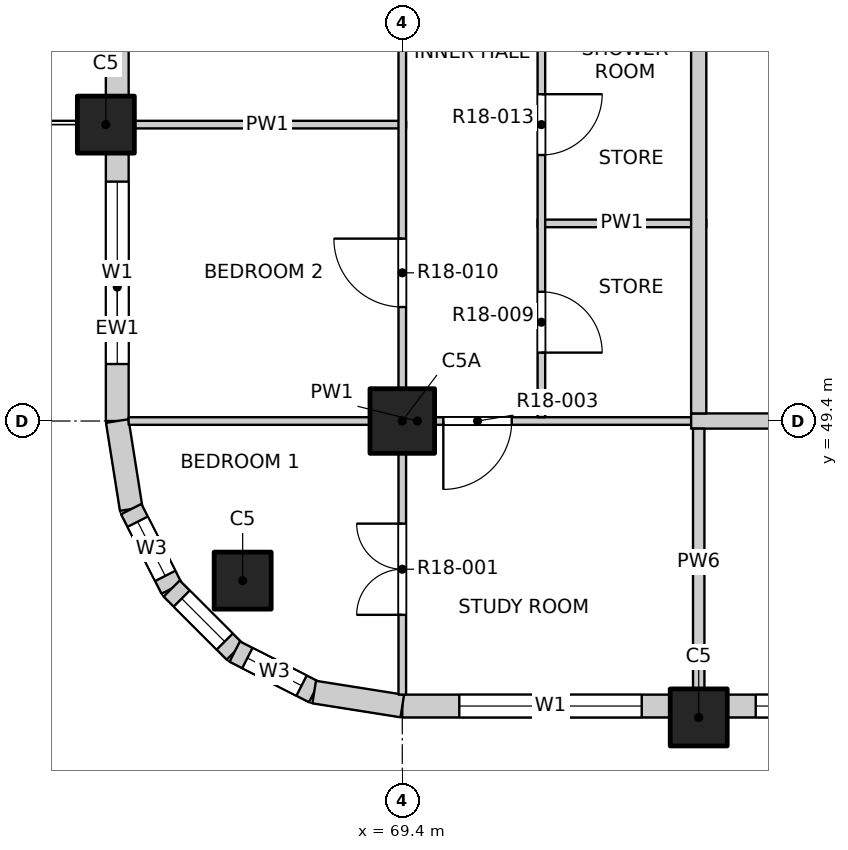
"""IFC4 building model, lengths in metres.
Left out: names, types, materials, properties, quantities, classifications, styles, units other than length and angle.
Written with IfcOpenShell. Run it as: python <this file> out.ifc"""

import sys

from ifc_helpers import new_model, si_unit, direction, frame, frame_2d, origin, origin_2d, place, context, subcontext, project, spatial, rectangle, extrude, element, fill, save


model = new_model("IFC4")
c1 = context("Model", 3, precision=1e-05, world=origin(), true_north=direction((0.0, 1.0)))
c2 = subcontext(c1, "Body", "Model", "MODEL_VIEW")
j1 = project(units=[si_unit("LENGTHUNIT", "METRE"), si_unit("PLANEANGLEUNIT", "RADIAN")], contexts=[c1])
p1 = place(None, origin())
s1 = spatial("IfcSite", under=j1, at=p1, CompositionType="ELEMENT")
p2 = place(p1, origin())
s2 = spatial("IfcBuilding", under=s1, at=p2, CompositionType="ELEMENT")
p3 = place(p2, frame((0.0, 0.0, 186.0)))
s3 = spatial("IfcBuildingStorey", under=s2, at=p3, CompositionType="ELEMENT", Elevation=186.0)
for number, where, z_axis, x_axis in (
    (1, (67.3, 47.3, -0.25), (0.0, 0.0, 1.0), (1.0, 0.0, 0.0)),
    (2, (65.5, 53.3, -0.25), (0.0, 0.0, 1.0), (1.0, 0.0, 0.0)),
    (3, (73.3, 45.5, -0.25), (0.0, 0.0, 1.0), (1.0, 0.0, 0.0)),
):
    element("IfcColumn", number, at=place(p3, frame(where, z_axis=z_axis, x_axis=x_axis)), inside=s3, PredefinedType="COLUMN", context=c2, shape_type="SweptSolid", body=[
        extrude(rectangle(XDim=0.75, YDim=0.75, at=origin_2d()), origin(), (0.0, 0.0, 1.0), 3.4),
    ])
p4 = place(p3, frame((69.4, 49.4, -0.25), z_axis=(0.0, 0.0, 1.0), x_axis=(1.0, 0.0, 0.0)))
e4 = element("IfcColumn", 4, at=p4, inside=s3, PredefinedType="COLUMN", context=c2, shape_type="SweptSolid", body=[
    extrude(rectangle(XDim=0.85, YDim=0.85, at=origin_2d()), origin(), (0.0, 0.0, 1.0), 3.4),
])
p5 = place(p3, frame((69.4, 45.65, 0.0), z_axis=(0.0, 0.0, 1.0), x_axis=(1.0, 0.0, 0.0)))
e5 = element("IfcWall", 5, at=p5, inside=s3, PredefinedType="SOLIDWALL", context=c2, shape_type="SweptSolid", body=[
    extrude(rectangle(XDim=3.525, YDim=0.3, at=frame_2d((1.763, 0.0))), origin(), (0.0, 0.0, 1.0), 2.7),
])
p6 = place(p5, frame((0.75, 0.0, 0.9)))
e6 = element("IfcOpeningElement", 6, at=p6, cuts=e5, PredefinedType="OPENING", context=c2, shape_type="SweptSolid", body=[
    extrude(rectangle(XDim=2.4, YDim=1.8, at=frame_2d((1.2, 0.9))), frame((0.0, 0.16, 0.0), z_axis=(0.0, -1.0, 0.0), x_axis=(1.0, 0.0, 0.0)), (0.0, 0.0, 1.0), 0.32),
])
p7 = place(p3, frame((73.675, 45.65, 0.0), z_axis=(0.0, 0.0, 1.0), x_axis=(1.0, 0.0, 0.0)))
e7 = element("IfcWall", 7, at=p7, inside=s3, PredefinedType="SOLIDWALL", context=c2, shape_type="SweptSolid", body=[
    extrude(rectangle(XDim=7.05, YDim=0.3, at=frame_2d((3.525, 0.0))), origin(), (0.0, 0.0, 1.0), 2.7),
])
p8 = place(p7, frame((0.375, 0.0, 0.9)))
e8 = element("IfcOpeningElement", 8, at=p8, cuts=e7, PredefinedType="OPENING", context=c2, shape_type="SweptSolid", body=[
    extrude(rectangle(XDim=2.4, YDim=1.8, at=frame_2d((1.2, 0.9))), frame((0.0, 0.16, 0.0), z_axis=(0.0, -1.0, 0.0), x_axis=(1.0, 0.0, 0.0)), (0.0, 0.0, 1.0), 0.32),
])
p9 = place(p7, frame((4.275, 0.0, 0.9)))
e9 = element("IfcOpeningElement", 9, at=p9, cuts=e7, PredefinedType="OPENING", context=c2, shape_type="SweptSolid", body=[
    extrude(rectangle(XDim=2.4, YDim=1.8, at=frame_2d((1.2, 0.9))), frame((0.0, 0.16, 0.0), z_axis=(0.0, -1.0, 0.0), x_axis=(1.0, 0.0, 0.0)), (0.0, 0.0, 1.0), 0.32),
])
p10 = place(p3, frame((65.65, 49.4, 0.0), z_axis=(0.0, 0.0, 1.0), x_axis=(0.0, 1.0, 0.0)))
e10 = element("IfcWall", 10, at=p10, inside=s3, PredefinedType="SOLIDWALL", context=c2, shape_type="SweptSolid", body=[
    extrude(rectangle(XDim=3.525, YDim=0.3, at=frame_2d((1.763, 0.0))), origin(), (0.0, 0.0, 1.0), 2.7),
])
p11 = place(p10, frame((0.75, 0.0, 0.9)))
e11 = element("IfcOpeningElement", 11, at=p11, cuts=e10, PredefinedType="OPENING", context=c2, shape_type="SweptSolid", body=[
    extrude(rectangle(XDim=2.4, YDim=1.8, at=frame_2d((1.2, 0.9))), frame((0.0, 0.16, 0.0), z_axis=(0.0, -1.0, 0.0), x_axis=(1.0, 0.0, 0.0)), (0.0, 0.0, 1.0), 0.32),
])
p12 = place(p3, frame((65.65, 53.675, 0.0), z_axis=(0.0, 0.0, 1.0), x_axis=(0.0, 1.0, 0.0)))
e12 = element("IfcWall", 12, at=p12, inside=s3, PredefinedType="SOLIDWALL", context=c2, shape_type="SweptSolid", body=[
    extrude(rectangle(XDim=7.05, YDim=0.3, at=frame_2d((3.525, 0.0))), origin(), (0.0, 0.0, 1.0), 2.7),
])
p13 = place(p12, frame((0.675, 0.0, 0.0)))
e13 = element("IfcOpeningElement", 13, at=p13, cuts=e12, PredefinedType="OPENING", context=c2, shape_type="SweptSolid", body=[
    extrude(rectangle(XDim=1.8, YDim=2.4, at=frame_2d((0.9, 1.2))), frame((0.0, 0.16, 0.0), z_axis=(0.0, -1.0, 0.0), x_axis=(1.0, 0.0, 0.0)), (0.0, 0.0, 1.0), 0.32),
])
p14 = place(p12, frame((4.275, 0.0, 0.9)))
e14 = element("IfcOpeningElement", 14, at=p14, cuts=e12, PredefinedType="OPENING", context=c2, shape_type="SweptSolid", body=[
    extrude(rectangle(XDim=2.4, YDim=1.8, at=frame_2d((1.2, 0.9))), frame((0.0, 0.16, 0.0), z_axis=(0.0, -1.0, 0.0), x_axis=(1.0, 0.0, 0.0)), (0.0, 0.0, 1.0), 0.32),
])
p15 = place(p3, frame((65.65, 49.4, 0.0), z_axis=(0.0, 0.0, 1.0), x_axis=(0.156496880861, -0.987678452879, 0.0)))
e15 = element("IfcWall", 15, at=p15, inside=s3, PredefinedType="SOLIDWALL", context=c2, shape_type="SweptSolid", body=[
    extrude(rectangle(XDim=1.173, YDim=0.3, at=frame_2d((0.586, 0.0))), origin(), (0.0, 0.0, 1.0), 2.7),
])
p16 = place(p3, frame((65.833, 48.241, 0.0), z_axis=(0.0, 0.0, 1.0), x_axis=(0.454025524128, -0.890988677504, 0.0)))
e16 = element("IfcWall", 16, at=p16, inside=s3, PredefinedType="SOLIDWALL", context=c2, shape_type="SweptSolid", body=[
    extrude(rectangle(XDim=1.173, YDim=0.3, at=frame_2d((0.587, 0.0))), origin(), (0.0, 0.0, 1.0), 2.7),
])
p17 = place(p16, frame((0.187, 0.0, 0.9)))
e17 = element("IfcOpeningElement", 17, at=p17, cuts=e16, PredefinedType="OPENING", context=c2, shape_type="SweptSolid", body=[
    extrude(rectangle(XDim=0.8, YDim=1.2, at=frame_2d((0.4, 0.6))), frame((0.0, 0.16, 0.0), z_axis=(0.0, -1.0, 0.0), x_axis=(1.0, 0.0, 0.0)), (0.0, 0.0, 1.0), 0.32),
])
p18 = place(p3, frame((66.366, 47.196, 0.0), z_axis=(0.0, 0.0, 1.0), x_axis=(0.707106781187, -0.707106781187, 0.0)))
e18 = element("IfcWall", 18, at=p18, inside=s3, PredefinedType="SOLIDWALL", context=c2, shape_type="SweptSolid", body=[
    extrude(rectangle(XDim=1.173, YDim=0.3, at=frame_2d((0.586, 0.0))), origin(), (0.0, 0.0, 1.0), 2.7),
])
p19 = place(p18, frame((0.187, 0.0, 0.9)))
e19 = element("IfcOpeningElement", 19, at=p19, cuts=e18, PredefinedType="OPENING", context=c2, shape_type="SweptSolid", body=[
    extrude(rectangle(XDim=0.8, YDim=1.2, at=frame_2d((0.4, 0.6))), frame((0.0, 0.16, 0.0), z_axis=(0.0, -1.0, 0.0), x_axis=(1.0, 0.0, 0.0)), (0.0, 0.0, 1.0), 0.32),
])
p20 = place(p3, frame((67.196, 46.366, 0.0), z_axis=(0.0, 0.0, 1.0), x_axis=(0.890988677504, -0.454025524128, 0.0)))
e20 = element("IfcWall", 20, at=p20, inside=s3, PredefinedType="SOLIDWALL", context=c2, shape_type="SweptSolid", body=[
    extrude(rectangle(XDim=1.173, YDim=0.3, at=frame_2d((0.587, 0.0))), origin(), (0.0, 0.0, 1.0), 2.7),
])
p21 = place(p20, frame((0.187, 0.0, 0.9)))
e21 = element("IfcOpeningElement", 21, at=p21, cuts=e20, PredefinedType="OPENING", context=c2, shape_type="SweptSolid", body=[
    extrude(rectangle(XDim=0.8, YDim=1.2, at=frame_2d((0.4, 0.6))), frame((0.0, 0.16, 0.0), z_axis=(0.0, -1.0, 0.0), x_axis=(1.0, 0.0, 0.0)), (0.0, 0.0, 1.0), 0.32),
])
p22 = place(p3, frame((68.241, 45.833, 0.0), z_axis=(0.0, 0.0, 1.0), x_axis=(0.987678452879, -0.156496880861, 0.0)))
e22 = element("IfcWall", 22, at=p22, inside=s3, PredefinedType="SOLIDWALL", context=c2, shape_type="SweptSolid", body=[
    extrude(rectangle(XDim=1.173, YDim=0.3, at=frame_2d((0.586, 0.0))), origin(), (0.0, 0.0, 1.0), 2.7),
])
p23 = place(p3, frame((65.8, 49.4, 0.0), z_axis=(0.0, 0.0, 1.0), x_axis=(1.0, 0.0, 0.0)))
e23 = element("IfcWall", 23, at=p23, inside=s3, PredefinedType="PARTITIONING", context=c2, shape_type="SweptSolid", body=[
    extrude(rectangle(XDim=7.6, YDim=0.1, at=frame_2d((3.8, 0.0))), origin(), (0.0, 0.0, 1.0), 3.15),
])
p24 = place(p23, frame((4.14, 0.0, 0.0)))
e24 = element("IfcOpeningElement", 24, at=p24, cuts=e23, PredefinedType="OPENING", context=c2, shape_type="SweptSolid", body=[
    extrude(rectangle(XDim=0.9, YDim=2.1, at=frame_2d((0.45, 1.05))), frame((0.0, 0.06, 0.0), z_axis=(0.0, -1.0, 0.0), x_axis=(1.0, 0.0, 0.0)), (0.0, 0.0, 1.0), 0.12),
])
p25 = place(p3, frame((73.2, 49.4, 0.0), z_axis=(0.0, 0.0, 1.0), x_axis=(1.0, 0.0, 0.0)))
e25 = element("IfcWall", 25, at=p25, inside=s3, PredefinedType="PARTITIONING", context=c2, shape_type="SweptSolid", body=[
    extrude(rectangle(XDim=23.6, YDim=0.2, at=frame_2d((11.8, 0.0))), origin(), (0.0, 0.0, 1.0), 3.15),
])
p26 = place(p25, frame((4.525, 0.0, 0.0)))
e26 = element("IfcOpeningElement", 26, at=p26, cuts=e25, PredefinedType="OPENING", context=c2, shape_type="SweptSolid", body=[
    extrude(rectangle(XDim=1.2, YDim=2.1, at=frame_2d((0.6, 1.05))), frame((0.0, 0.11, 0.0), z_axis=(0.0, -1.0, 0.0), x_axis=(1.0, 0.0, 0.0)), (0.0, 0.0, 1.0), 0.22),
])
p27 = place(p25, frame((12.325, 0.0, 0.0)))
e27 = element("IfcOpeningElement", 27, at=p27, cuts=e25, PredefinedType="OPENING", context=c2, shape_type="SweptSolid", body=[
    extrude(rectangle(XDim=1.2, YDim=2.1, at=frame_2d((0.6, 1.05))), frame((0.0, 0.11, 0.0), z_axis=(0.0, -1.0, 0.0), x_axis=(1.0, 0.0, 0.0)), (0.0, 0.0, 1.0), 0.22),
])
p28 = place(p25, frame((20.125, 0.0, 0.0)))
e28 = element("IfcOpeningElement", 28, at=p28, cuts=e25, PredefinedType="OPENING", context=c2, shape_type="SweptSolid", body=[
    extrude(rectangle(XDim=1.2, YDim=2.1, at=frame_2d((0.6, 1.05))), frame((0.0, 0.11, 0.0), z_axis=(0.0, -1.0, 0.0), x_axis=(1.0, 0.0, 0.0)), (0.0, 0.0, 1.0), 0.22),
])
p29 = place(p3, frame((71.18, 52.0, 0.0), z_axis=(0.0, 0.0, 1.0), x_axis=(1.0, 0.0, 0.0)))
e29 = element("IfcWall", 29, at=p29, inside=s3, PredefinedType="PARTITIONING", context=c2, shape_type="SweptSolid", body=[
    extrude(rectangle(XDim=2.22, YDim=0.1, at=frame_2d((1.11, 0.0))), origin(), (0.0, 0.0, 1.0), 3.15),
])
p30 = place(p3, frame((65.8, 53.3, 0.0), z_axis=(0.0, 0.0, 1.0), x_axis=(1.0, 0.0, 0.0)))
e30 = element("IfcWall", 30, at=p30, inside=s3, PredefinedType="PARTITIONING", context=c2, shape_type="SweptSolid", body=[
    extrude(rectangle(XDim=3.65, YDim=0.1, at=frame_2d((1.825, 0.0))), origin(), (0.0, 0.0, 1.0), 3.15),
])
p31 = place(p3, frame((69.4, 45.8, 0.0), z_axis=(0.0, 0.0, 1.0), x_axis=(0.0, 1.0, 0.0)))
e31 = element("IfcWall", 31, at=p31, inside=s3, PredefinedType="PARTITIONING", context=c2, shape_type="SweptSolid", body=[
    extrude(rectangle(XDim=38.4, YDim=0.1, at=frame_2d((19.2, 0.0))), origin(), (0.0, 0.0, 1.0), 3.15),
])
p32 = place(p31, frame((1.05, 0.0, 0.0)))
e32 = element("IfcOpeningElement", 32, at=p32, cuts=e31, PredefinedType="OPENING", context=c2, shape_type="SweptSolid", body=[
    extrude(rectangle(XDim=1.2, YDim=2.1, at=frame_2d((0.6, 1.05))), frame((0.0, 0.06, 0.0), z_axis=(0.0, -1.0, 0.0), x_axis=(1.0, 0.0, 0.0)), (0.0, 0.0, 1.0), 0.12),
])
p33 = place(p31, frame((5.1, 0.0, 0.0)))
e33 = element("IfcOpeningElement", 33, at=p33, cuts=e31, PredefinedType="OPENING", context=c2, shape_type="SweptSolid", body=[
    extrude(rectangle(XDim=0.9, YDim=2.1, at=frame_2d((0.45, 1.05))), frame((0.0, 0.06, 0.0), z_axis=(0.0, -1.0, 0.0), x_axis=(1.0, 0.0, 0.0)), (0.0, 0.0, 1.0), 0.12),
])
p34 = place(p31, frame((9.0, 0.0, 0.0)))
e34 = element("IfcOpeningElement", 34, at=p34, cuts=e31, PredefinedType="OPENING", context=c2, shape_type="SweptSolid", body=[
    extrude(rectangle(XDim=0.9, YDim=2.1, at=frame_2d((0.45, 1.05))), frame((0.0, 0.06, 0.0), z_axis=(0.0, -1.0, 0.0), x_axis=(1.0, 0.0, 0.0)), (0.0, 0.0, 1.0), 0.12),
])
p35 = place(p31, frame((12.9, 0.0, 0.0)))
e35 = element("IfcOpeningElement", 35, at=p35, cuts=e31, PredefinedType="OPENING", context=c2, shape_type="SweptSolid", body=[
    extrude(rectangle(XDim=0.9, YDim=2.1, at=frame_2d((0.45, 1.05))), frame((0.0, 0.06, 0.0), z_axis=(0.0, -1.0, 0.0), x_axis=(1.0, 0.0, 0.0)), (0.0, 0.0, 1.0), 0.12),
])
p36 = place(p31, frame((16.8, 0.0, 0.0)))
e36 = element("IfcOpeningElement", 36, at=p36, cuts=e31, PredefinedType="OPENING", context=c2, shape_type="SweptSolid", body=[
    extrude(rectangle(XDim=0.9, YDim=2.1, at=frame_2d((0.45, 1.05))), frame((0.0, 0.06, 0.0), z_axis=(0.0, -1.0, 0.0), x_axis=(1.0, 0.0, 0.0)), (0.0, 0.0, 1.0), 0.12),
])
p37 = place(p31, frame((20.7, 0.0, 0.0)))
e37 = element("IfcOpeningElement", 37, at=p37, cuts=e31, PredefinedType="OPENING", context=c2, shape_type="SweptSolid", body=[
    extrude(rectangle(XDim=0.9, YDim=2.1, at=frame_2d((0.45, 1.05))), frame((0.0, 0.06, 0.0), z_axis=(0.0, -1.0, 0.0), x_axis=(1.0, 0.0, 0.0)), (0.0, 0.0, 1.0), 0.12),
])
p38 = place(p31, frame((24.6, 0.0, 0.0)))
e38 = element("IfcOpeningElement", 38, at=p38, cuts=e31, PredefinedType="OPENING", context=c2, shape_type="SweptSolid", body=[
    extrude(rectangle(XDim=0.9, YDim=2.1, at=frame_2d((0.45, 1.05))), frame((0.0, 0.06, 0.0), z_axis=(0.0, -1.0, 0.0), x_axis=(1.0, 0.0, 0.0)), (0.0, 0.0, 1.0), 0.12),
])
p39 = place(p31, frame((28.5, 0.0, 0.0)))
e39 = element("IfcOpeningElement", 39, at=p39, cuts=e31, PredefinedType="OPENING", context=c2, shape_type="SweptSolid", body=[
    extrude(rectangle(XDim=0.9, YDim=2.1, at=frame_2d((0.45, 1.05))), frame((0.0, 0.06, 0.0), z_axis=(0.0, -1.0, 0.0), x_axis=(1.0, 0.0, 0.0)), (0.0, 0.0, 1.0), 0.12),
])
p40 = place(p31, frame((32.4, 0.0, 0.0)))
e40 = element("IfcOpeningElement", 40, at=p40, cuts=e31, PredefinedType="OPENING", context=c2, shape_type="SweptSolid", body=[
    extrude(rectangle(XDim=0.9, YDim=2.1, at=frame_2d((0.45, 1.05))), frame((0.0, 0.06, 0.0), z_axis=(0.0, -1.0, 0.0), x_axis=(1.0, 0.0, 0.0)), (0.0, 0.0, 1.0), 0.12),
])
p41 = place(p31, frame((36.15, 0.0, 0.0)))
e41 = element("IfcOpeningElement", 41, at=p41, cuts=e31, PredefinedType="OPENING", context=c2, shape_type="SweptSolid", body=[
    extrude(rectangle(XDim=1.2, YDim=2.1, at=frame_2d((0.6, 1.05))), frame((0.0, 0.06, 0.0), z_axis=(0.0, -1.0, 0.0), x_axis=(1.0, 0.0, 0.0)), (0.0, 0.0, 1.0), 0.12),
])
p42 = place(p3, frame((71.23, 49.45, 0.0), z_axis=(0.0, 0.0, 1.0), x_axis=(0.0, 1.0, 0.0)))
e42 = element("IfcWall", 42, at=p42, inside=s3, PredefinedType="PARTITIONING", context=c2, shape_type="SweptSolid", body=[
    extrude(rectangle(XDim=12.55, YDim=0.1, at=frame_2d((6.275, 0.0))), origin(), (0.0, 0.0, 1.0), 3.15),
])
p43 = place(p42, frame((0.85, 0.0, 0.0)))
e43 = element("IfcOpeningElement", 43, at=p43, cuts=e42, PredefinedType="OPENING", context=c2, shape_type="SweptSolid", body=[
    extrude(rectangle(XDim=0.8, YDim=2.1, at=frame_2d((0.4, 1.05))), frame((0.0, 0.06, 0.0), z_axis=(0.0, -1.0, 0.0), x_axis=(1.0, 0.0, 0.0)), (0.0, 0.0, 1.0), 0.12),
])
p44 = place(p42, frame((3.45, 0.0, 0.0)))
e44 = element("IfcOpeningElement", 44, at=p44, cuts=e42, PredefinedType="OPENING", context=c2, shape_type="SweptSolid", body=[
    extrude(rectangle(XDim=0.8, YDim=2.1, at=frame_2d((0.4, 1.05))), frame((0.0, 0.06, 0.0), z_axis=(0.0, -1.0, 0.0), x_axis=(1.0, 0.0, 0.0)), (0.0, 0.0, 1.0), 0.12),
])
p45 = place(p42, frame((5.615, 0.0, 0.0)))
e45 = element("IfcOpeningElement", 45, at=p45, cuts=e42, PredefinedType="OPENING", context=c2, shape_type="SweptSolid", body=[
    extrude(rectangle(XDim=0.9, YDim=2.1, at=frame_2d((0.45, 1.05))), frame((0.0, 0.06, 0.0), z_axis=(0.0, -1.0, 0.0), x_axis=(1.0, 0.0, 0.0)), (0.0, 0.0, 1.0), 0.12),
])
p46 = place(p42, frame((7.73, 0.0, 0.0)))
e46 = element("IfcOpeningElement", 46, at=p46, cuts=e42, PredefinedType="OPENING", context=c2, shape_type="SweptSolid", body=[
    extrude(rectangle(XDim=0.9, YDim=2.1, at=frame_2d((0.45, 1.05))), frame((0.0, 0.06, 0.0), z_axis=(0.0, -1.0, 0.0), x_axis=(1.0, 0.0, 0.0)), (0.0, 0.0, 1.0), 0.12),
])
p47 = place(p42, frame((10.54, 0.0, 0.0)))
e47 = element("IfcOpeningElement", 47, at=p47, cuts=e42, PredefinedType="OPENING", context=c2, shape_type="SweptSolid", body=[
    extrude(rectangle(XDim=0.9, YDim=2.1, at=frame_2d((0.45, 1.05))), frame((0.0, 0.06, 0.0), z_axis=(0.0, -1.0, 0.0), x_axis=(1.0, 0.0, 0.0)), (0.0, 0.0, 1.0), 0.12),
])
p48 = place(p3, frame((73.3, 45.8, 0.0), z_axis=(0.0, 0.0, 1.0), x_axis=(0.0, 1.0, 0.0)))
e48 = element("IfcWall", 48, at=p48, inside=s3, PredefinedType="PARTITIONING", context=c2, shape_type="SweptSolid", body=[
    extrude(rectangle(XDim=3.5, YDim=0.15, at=frame_2d((1.75, 0.0))), origin(), (0.0, 0.0, 1.0), 3.15),
])
p49 = place(p3, frame((73.3, 49.5, 0.0), z_axis=(0.0, 0.0, 1.0), x_axis=(0.0, 1.0, 0.0)))
e49 = element("IfcWall", 49, at=p49, inside=s3, PredefinedType="PARTITIONING", context=c2, shape_type="SweptSolid", body=[
    extrude(rectangle(XDim=34.7, YDim=0.2, at=frame_2d((17.35, 0.0))), origin(), (0.0, 0.0, 1.0), 3.15),
])
p50 = place(p49, frame((13.825, 0.0, 0.0)))
e50 = element("IfcOpeningElement", 50, at=p50, cuts=e49, PredefinedType="OPENING", context=c2, shape_type="SweptSolid", body=[
    extrude(rectangle(XDim=1.0, YDim=2.1, at=frame_2d((0.5, 1.05))), frame((0.0, 0.11, 0.0), z_axis=(0.0, -1.0, 0.0), x_axis=(1.0, 0.0, 0.0)), (0.0, 0.0, 1.0), 0.22),
])
p51 = place(p49, frame((21.975, 0.0, 0.0)))
e51 = element("IfcOpeningElement", 51, at=p51, cuts=e49, PredefinedType="OPENING", context=c2, shape_type="SweptSolid", body=[
    extrude(rectangle(XDim=1.0, YDim=2.1, at=frame_2d((0.5, 1.05))), frame((0.0, 0.11, 0.0), z_axis=(0.0, -1.0, 0.0), x_axis=(1.0, 0.0, 0.0)), (0.0, 0.0, 1.0), 0.22),
])
p52 = place(p6, origin())
e52 = element("IfcWindow", 52, at=p52, inside=s3, PartitioningType="DOUBLE_PANEL_VERTICAL", PredefinedType="WINDOW", context=c2, shape_type="SweptSolid", body=[
    extrude(rectangle(XDim=2.4, YDim=1.8, at=frame_2d((1.2, 0.9))), frame((0.0, 0.03, 0.0), z_axis=(0.0, -1.0, 0.0), x_axis=(1.0, 0.0, 0.0)), (0.0, 0.0, 1.0), 0.06),
])
fill(e6, e52)
p53 = place(p8, origin())
e53 = element("IfcWindow", 53, at=p53, inside=s3, PartitioningType="DOUBLE_PANEL_VERTICAL", PredefinedType="WINDOW", context=c2, shape_type="SweptSolid", body=[
    extrude(rectangle(XDim=2.4, YDim=1.8, at=frame_2d((1.2, 0.9))), frame((0.0, 0.03, 0.0), z_axis=(0.0, -1.0, 0.0), x_axis=(1.0, 0.0, 0.0)), (0.0, 0.0, 1.0), 0.06),
])
fill(e8, e53)
p54 = place(p11, origin())
e54 = element("IfcWindow", 54, at=p54, inside=s3, PartitioningType="DOUBLE_PANEL_VERTICAL", PredefinedType="WINDOW", context=c2, shape_type="SweptSolid", body=[
    extrude(rectangle(XDim=2.4, YDim=1.8, at=frame_2d((1.2, 0.9))), frame((0.0, 0.03, 0.0), z_axis=(0.0, -1.0, 0.0), x_axis=(1.0, 0.0, 0.0)), (0.0, 0.0, 1.0), 0.06),
])
fill(e11, e54)
p55 = place(p17, origin())
e55 = element("IfcWindow", 55, at=p55, inside=s3, PartitioningType="SINGLE_PANEL", PredefinedType="WINDOW", context=c2, shape_type="SweptSolid", body=[
    extrude(rectangle(XDim=0.8, YDim=1.2, at=frame_2d((0.4, 0.6))), frame((0.0, 0.03, 0.0), z_axis=(0.0, -1.0, 0.0), x_axis=(1.0, 0.0, 0.0)), (0.0, 0.0, 1.0), 0.06),
])
fill(e17, e55)
p56 = place(p19, origin())
e56 = element("IfcWindow", 56, at=p56, inside=s3, PartitioningType="SINGLE_PANEL", PredefinedType="WINDOW", context=c2, shape_type="SweptSolid", body=[
    extrude(rectangle(XDim=0.8, YDim=1.2, at=frame_2d((0.4, 0.6))), frame((0.0, 0.03, 0.0), z_axis=(0.0, -1.0, 0.0), x_axis=(1.0, 0.0, 0.0)), (0.0, 0.0, 1.0), 0.06),
])
fill(e19, e56)
p57 = place(p21, origin())
e57 = element("IfcWindow", 57, at=p57, inside=s3, PartitioningType="SINGLE_PANEL", PredefinedType="WINDOW", context=c2, shape_type="SweptSolid", body=[
    extrude(rectangle(XDim=0.8, YDim=1.2, at=frame_2d((0.4, 0.6))), frame((0.0, 0.03, 0.0), z_axis=(0.0, -1.0, 0.0), x_axis=(1.0, 0.0, 0.0)), (0.0, 0.0, 1.0), 0.06),
])
fill(e21, e57)
p58 = place(p32, origin())
e58 = element("IfcDoor", 58, at=p58, inside=s3, OperationType="DOUBLE_DOOR_SINGLE_SWING", PredefinedType="DOOR", context=c2, shape_type="SweptSolid", body=[
    extrude(rectangle(XDim=1.2, YDim=2.1, at=frame_2d((0.6, 1.05))), frame((0.0, 0.025, 0.0), z_axis=(0.0, -1.0, 0.0), x_axis=(1.0, 0.0, 0.0)), (0.0, 0.0, 1.0), 0.05),
])
fill(e32, e58)
p59 = place(p24, origin())
e59 = element("IfcDoor", 59, at=p59, inside=s3, OperationType="SINGLE_SWING_RIGHT", PredefinedType="DOOR", context=c2, shape_type="SweptSolid", body=[
    extrude(rectangle(XDim=0.9, YDim=2.1, at=frame_2d((0.45, 1.05))), frame((0.0, 0.025, 0.0), z_axis=(0.0, -1.0, 0.0), x_axis=(1.0, 0.0, 0.0)), (0.0, 0.0, 1.0), 0.05),
])
fill(e24, e59)
p60 = place(p43, origin())
e60 = element("IfcDoor", 60, at=p60, inside=s3, OperationType="SINGLE_SWING_RIGHT", PredefinedType="DOOR", context=c2, shape_type="SweptSolid", body=[
    extrude(rectangle(XDim=0.8, YDim=2.1, at=frame_2d((0.4, 1.05))), frame((0.0, 0.025, 0.0), z_axis=(0.0, -1.0, 0.0), x_axis=(1.0, 0.0, 0.0)), (0.0, 0.0, 1.0), 0.05),
])
fill(e43, e60)
p61 = place(p33, origin())
e61 = element("IfcDoor", 61, at=p61, inside=s3, OperationType="SINGLE_SWING_RIGHT", PredefinedType="DOOR", context=c2, shape_type="SweptSolid", body=[
    extrude(rectangle(XDim=0.9, YDim=2.1, at=frame_2d((0.45, 1.05))), frame((0.0, 0.025, 0.0), z_axis=(0.0, -1.0, 0.0), x_axis=(1.0, 0.0, 0.0)), (0.0, 0.0, 1.0), 0.05),
])
fill(e33, e61)
p62 = place(p44, origin())
e62 = element("IfcDoor", 62, at=p62, inside=s3, OperationType="SINGLE_SWING_LEFT", PredefinedType="DOOR", context=c2, shape_type="SweptSolid", body=[
    extrude(rectangle(XDim=0.8, YDim=2.1, at=frame_2d((0.4, 1.05))), frame((0.0, 0.025, 0.0), z_axis=(0.0, -1.0, 0.0), x_axis=(1.0, 0.0, 0.0)), (0.0, 0.0, 1.0), 0.05),
])
fill(e44, e62)
save(model, sys.argv[1])
